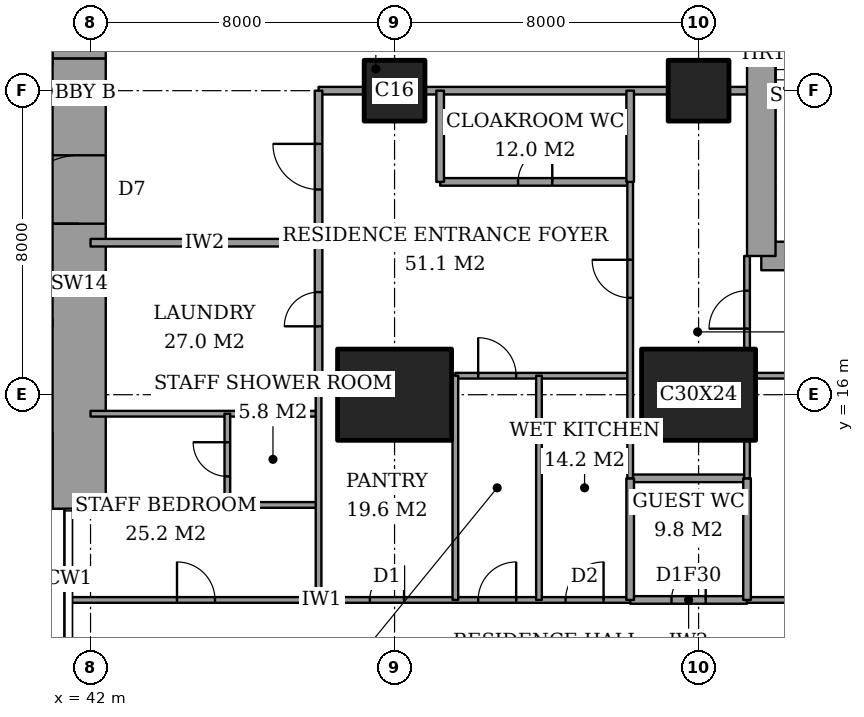
"""IFC4 building model, lengths in metres.
Left out: names, types, materials, properties, quantities, classifications, styles, units other than length and angle.
Written with IfcOpenShell. Run it as: python <this file> out.ifc"""

import sys

from ifc_helpers import new_model, si_unit, direction, frame, frame_2d, origin, origin_2d, place, context, subcontext, project, spatial, rectangle, extrude, element, fill, save


model = new_model("IFC4")
c1 = context("Model", 3, precision=1e-05, world=origin(), true_north=direction((0.0, 1.0)))
c2 = subcontext(c1, "Body", "Model", "MODEL_VIEW")
j1 = project(units=[si_unit("LENGTHUNIT", "METRE"), si_unit("PLANEANGLEUNIT", "RADIAN")], contexts=[c1])
p1 = place(None, origin())
s1 = spatial("IfcSite", under=j1, at=p1, CompositionType="ELEMENT")
p2 = place(p1, origin())
s2 = spatial("IfcBuilding", under=s1, at=p2, CompositionType="ELEMENT")
p3 = place(p2, frame((0.0, 0.0, 266.4)))
s3 = spatial("IfcBuildingStorey", under=s2, at=p3, CompositionType="ELEMENT", Elevation=266.4)
p4 = place(p3, frame((50.0, 16.0, 0.0), z_axis=(0.0, 0.0, 1.0), x_axis=(1.0, 0.0, 0.0)))
e1 = element("IfcColumn", 1, at=p4, inside=s3, PredefinedType="COLUMN", context=c2, shape_type="SweptSolid", body=[
    extrude(rectangle(XDim=3.0, YDim=2.4, at=origin_2d()), origin(), (0.0, 0.0, 1.0), 3.6),
])
p5 = place(p3, frame((50.0, 24.0, 0.0), z_axis=(0.0, 0.0, 1.0), x_axis=(1.0, 0.0, 0.0)))
e2 = element("IfcColumn", 2, at=p5, inside=s3, PredefinedType="COLUMN", context=c2, shape_type="SweptSolid", body=[
    extrude(rectangle(XDim=1.6, YDim=1.6, at=origin_2d()), origin(), (0.0, 0.0, 1.0), 3.6),
])
p6 = place(p3, frame((58.0, 16.0, 0.0), z_axis=(0.0, 0.0, 1.0), x_axis=(1.0, 0.0, 0.0)))
e3 = element("IfcColumn", 3, at=p6, inside=s3, PredefinedType="COLUMN", context=c2, shape_type="SweptSolid", body=[
    extrude(rectangle(XDim=3.0, YDim=2.4, at=origin_2d()), origin(), (0.0, 0.0, 1.0), 3.6),
])
p7 = place(p3, frame((58.0, 24.0, 0.0), z_axis=(0.0, 0.0, 1.0), x_axis=(1.0, 0.0, 0.0)))
e4 = element("IfcColumn", 4, at=p7, inside=s3, PredefinedType="COLUMN", context=c2, shape_type="SweptSolid", body=[
    extrude(rectangle(XDim=1.6, YDim=1.6, at=origin_2d()), origin(), (0.0, 0.0, 1.0), 3.6),
])
p8 = place(p3, frame((41.7, 13.0, 0.0), z_axis=(0.0, 0.0, 1.0), x_axis=(0.0, 1.0, 0.0)))
e5 = element("IfcWall", 5, at=p8, inside=s3, PredefinedType="SHEAR", context=c2, shape_type="SweptSolid", body=[
    extrude(rectangle(XDim=11.85, YDim=1.4, at=frame_2d((5.925, 0.0))), origin(), (0.0, 0.0, 1.0), 3.6),
])
p9 = place(p8, frame((7.5, 0.0, 0.0)))
e6 = element("IfcOpeningElement", 6, at=p9, cuts=e5, PredefinedType="OPENING", context=c2, shape_type="SweptSolid", body=[
    extrude(rectangle(XDim=1.8, YDim=2.4, at=frame_2d((0.9, 1.2))), frame((0.0, 0.71, 0.0), z_axis=(0.0, -1.0, 0.0), x_axis=(1.0, 0.0, 0.0)), (0.0, 0.0, 1.0), 1.42),
])
p10 = place(p3, frame((41.7, 24.85, 0.0), z_axis=(0.0, 0.0, 1.0), x_axis=(0.0, 1.0, 0.0)))
e7 = element("IfcWall", 7, at=p10, inside=s3, PredefinedType="SHEAR", context=c2, shape_type="SweptSolid", body=[
    extrude(rectangle(XDim=10.15, YDim=1.4, at=frame_2d((5.075, 0.0))), origin(), (0.0, 0.0, 1.0), 3.6),
])
p11 = place(p3, frame((59.65, 19.65, 0.0), z_axis=(0.0, 0.0, 1.0), x_axis=(1.0, 0.0, 0.0)))
e8 = element("IfcWall", 8, at=p11, inside=s3, PredefinedType="SHEAR", context=c2, shape_type="SweptSolid", body=[
    extrude(rectangle(XDim=4.45, YDim=0.75, at=frame_2d((2.225, 0.0))), origin(), (0.0, 0.0, 1.0), 3.6),
])
p12 = place(p3, frame((59.65, 28.35, 0.0), z_axis=(0.0, 0.0, 1.0), x_axis=(0.0, -1.0, 0.0)))
e9 = element("IfcWall", 9, at=p12, inside=s3, PredefinedType="SHEAR", context=c2, shape_type="SweptSolid", body=[
    extrude(rectangle(XDim=8.7, YDim=0.75, at=frame_2d((4.35, 0.0))), origin(), (0.0, 0.0, 1.0), 3.6),
])
p13 = place(p12, frame((0.975, 0.0, 0.0)))
e10 = element("IfcOpeningElement", 10, at=p13, cuts=e9, PredefinedType="OPENING", context=c2, shape_type="SweptSolid", body=[
    extrude(rectangle(XDim=1.0, YDim=2.1, at=frame_2d((0.5, 1.05))), frame((0.0, 0.385, 0.0), z_axis=(0.0, -1.0, 0.0), x_axis=(1.0, 0.0, 0.0)), (0.0, 0.0, 1.0), 0.77),
])
p14 = place(p3, frame((56.2, 10.6, 0.0), z_axis=(0.0, 0.0, 1.0), x_axis=(1.0, 0.0, 0.0)))
e11 = element("IfcWall", 11, at=p14, inside=s3, PredefinedType="PARTITIONING", context=c2, shape_type="SweptSolid", body=[
    extrude(rectangle(XDim=3.075, YDim=0.2, at=frame_2d((1.538, 0.0))), origin(), (0.0, 0.0, 1.0), 3.35),
])
p15 = place(p14, frame((1.087, 0.0, 0.0)))
e12 = element("IfcOpeningElement", 12, at=p15, cuts=e11, PredefinedType="OPENING", context=c2, shape_type="SweptSolid", body=[
    extrude(rectangle(XDim=0.9, YDim=2.1, at=frame_2d((0.45, 1.05))), frame((0.0, 0.11, 0.0), z_axis=(0.0, -1.0, 0.0), x_axis=(1.0, 0.0, 0.0)), (0.0, 0.0, 1.0), 0.22),
])
p16 = place(p3, frame((41.439, 10.6, 0.0), z_axis=(0.0, 0.0, 1.0), x_axis=(1.0, 0.0, 0.0)))
e13 = element("IfcWall", 13, at=p16, inside=s3, PredefinedType="PARTITIONING", context=c2, shape_type="SweptSolid", body=[
    extrude(rectangle(XDim=14.761, YDim=0.15, at=frame_2d((7.38, 0.0))), origin(), (0.0, 0.0, 1.0), 3.35),
])
p17 = place(p16, frame((10.761, 0.0, 0.0)))
e14 = element("IfcOpeningElement", 14, at=p17, cuts=e13, PredefinedType="OPENING", context=c2, shape_type="SweptSolid", body=[
    extrude(rectangle(XDim=1.0, YDim=2.1, at=frame_2d((0.5, 1.05))), frame((0.0, 0.085, 0.0), z_axis=(0.0, -1.0, 0.0), x_axis=(1.0, 0.0, 0.0)), (0.0, 0.0, 1.0), 0.17),
])
p18 = place(p16, frame((13.061, 0.0, 0.0)))
e15 = element("IfcOpeningElement", 15, at=p18, cuts=e13, PredefinedType="OPENING", context=c2, shape_type="SweptSolid", body=[
    extrude(rectangle(XDim=1.0, YDim=2.1, at=frame_2d((0.5, 1.05))), frame((0.0, 0.085, 0.0), z_axis=(0.0, -1.0, 0.0), x_axis=(1.0, 0.0, 0.0)), (0.0, 0.0, 1.0), 0.17),
])
p19 = place(p16, frame((7.911, 0.0, 0.0)))
e16 = element("IfcOpeningElement", 16, at=p19, cuts=e13, PredefinedType="OPENING", context=c2, shape_type="SweptSolid", body=[
    extrude(rectangle(XDim=0.9, YDim=2.1, at=frame_2d((0.45, 1.05))), frame((0.0, 0.085, 0.0), z_axis=(0.0, -1.0, 0.0), x_axis=(1.0, 0.0, 0.0)), (0.0, 0.0, 1.0), 0.17),
])
p20 = place(p16, frame((2.836, 0.0, 0.0)))
e17 = element("IfcOpeningElement", 17, at=p20, cuts=e13, PredefinedType="OPENING", context=c2, shape_type="SweptSolid", body=[
    extrude(rectangle(XDim=1.0, YDim=2.1, at=frame_2d((0.5, 1.05))), frame((0.0, 0.085, 0.0), z_axis=(0.0, -1.0, 0.0), x_axis=(1.0, 0.0, 0.0)), (0.0, 0.0, 1.0), 0.17),
])
p21 = place(p3, frame((59.275, 10.6, 0.0), z_axis=(0.0, 0.0, 1.0), x_axis=(1.0, 0.0, 0.0)))
e18 = element("IfcWall", 18, at=p21, inside=s3, PredefinedType="PARTITIONING", context=c2, shape_type="SweptSolid", body=[
    extrude(rectangle(XDim=7.175, YDim=0.15, at=frame_2d((3.587, 0.0))), origin(), (0.0, 0.0, 1.0), 3.35),
])
p22 = place(p21, frame((3.087, 0.0, 0.0)))
e19 = element("IfcOpeningElement", 19, at=p22, cuts=e18, PredefinedType="OPENING", context=c2, shape_type="SweptSolid", body=[
    extrude(rectangle(XDim=1.0, YDim=2.1, at=frame_2d((0.5, 1.05))), frame((0.0, 0.085, 0.0), z_axis=(0.0, -1.0, 0.0), x_axis=(1.0, 0.0, 0.0)), (0.0, 0.0, 1.0), 0.17),
])
p23 = place(p3, frame((45.6, 13.1, 0.0), z_axis=(0.0, 0.0, 1.0), x_axis=(1.0, 0.0, 0.0)))
e20 = element("IfcWall", 20, at=p23, inside=s3, PredefinedType="PARTITIONING", context=c2, shape_type="SweptSolid", body=[
    extrude(rectangle(XDim=2.4, YDim=0.15, at=frame_2d((1.2, 0.0))), origin(), (0.0, 0.0, 1.0), 3.35),
])
p24 = place(p3, frame((56.2, 13.8, 0.0), z_axis=(0.0, 0.0, 1.0), x_axis=(1.0, 0.0, 0.0)))
e21 = element("IfcWall", 21, at=p24, inside=s3, PredefinedType="PARTITIONING", context=c2, shape_type="SweptSolid", body=[
    extrude(rectangle(XDim=3.075, YDim=0.2, at=frame_2d((1.538, 0.0))), origin(), (0.0, 0.0, 1.0), 3.35),
])
p25 = place(p3, frame((42.0, 15.5, 0.0), z_axis=(0.0, 0.0, 1.0), x_axis=(1.0, 0.0, 0.0)))
e22 = element("IfcWall", 22, at=p25, inside=s3, PredefinedType="PARTITIONING", context=c2, shape_type="SweptSolid", body=[
    extrude(rectangle(XDim=6.0, YDim=0.15, at=frame_2d((3.0, 0.0))), origin(), (0.0, 0.0, 1.0), 3.35),
])
p26 = place(p3, frame((48.0, 16.05, 0.0), z_axis=(0.0, 0.0, 1.0), x_axis=(1.0, 0.0, 0.0)))
e23 = element("IfcWall", 23, at=p26, inside=s3, PredefinedType="PARTITIONING", context=c2, shape_type="SweptSolid", body=[
    extrude(rectangle(XDim=0.5, YDim=0.15, at=frame_2d((0.25, 0.0))), origin(), (0.0, 0.0, 1.0), 2.634),
])
p27 = place(p3, frame((51.6, 16.5, 0.0), z_axis=(0.0, 0.0, 1.0), x_axis=(1.0, 0.0, 0.0)))
e24 = element("IfcWall", 24, at=p27, inside=s3, PredefinedType="PARTITIONING", context=c2, shape_type="SweptSolid", body=[
    extrude(rectangle(XDim=4.6, YDim=0.15, at=frame_2d((2.3, 0.0))), origin(), (0.0, 0.0, 1.0), 3.35),
])
p28 = place(p27, frame((0.6, 0.0, 0.0)))
e25 = element("IfcOpeningElement", 25, at=p28, cuts=e24, PredefinedType="OPENING", context=c2, shape_type="SweptSolid", body=[
    extrude(rectangle(XDim=1.0, YDim=2.1, at=frame_2d((0.5, 1.05))), frame((0.0, 0.085, 0.0), z_axis=(0.0, -1.0, 0.0), x_axis=(1.0, 0.0, 0.0)), (0.0, 0.0, 1.0), 0.17),
])
p29 = place(p3, frame((59.5, 16.5, 0.0), z_axis=(0.0, 0.0, 1.0), x_axis=(1.0, 0.0, 0.0)))
e26 = element("IfcWall", 26, at=p29, inside=s3, PredefinedType="PARTITIONING", context=c2, shape_type="SweptSolid", body=[
    extrude(rectangle(XDim=5.35, YDim=0.15, at=frame_2d((2.675, 0.0))), origin(), (0.0, 0.0, 1.0), 3.35),
])
p30 = place(p3, frame((42.0, 20.0, 0.0), z_axis=(0.0, 0.0, 1.0), x_axis=(1.0, 0.0, 0.0)))
e27 = element("IfcWall", 27, at=p30, inside=s3, PredefinedType="PARTITIONING", context=c2, shape_type="SweptSolid", body=[
    extrude(rectangle(XDim=6.0, YDim=0.2, at=frame_2d((3.0, 0.0))), origin(), (0.0, 0.0, 1.0), 3.35),
])
p31 = place(p3, frame((51.2, 21.6, 0.0), z_axis=(0.0, 0.0, 1.0), x_axis=(1.0, 0.0, 0.0)))
e28 = element("IfcWall", 28, at=p31, inside=s3, PredefinedType="PARTITIONING", context=c2, shape_type="SweptSolid", body=[
    extrude(rectangle(XDim=5.0, YDim=0.2, at=frame_2d((2.5, 0.0))), origin(), (0.0, 0.0, 1.0), 3.35),
])
p32 = place(p31, frame((2.05, 0.0, 0.0)))
e29 = element("IfcOpeningElement", 29, at=p32, cuts=e28, PredefinedType="OPENING", context=c2, shape_type="SweptSolid", body=[
    extrude(rectangle(XDim=0.9, YDim=2.1, at=frame_2d((0.45, 1.05))), frame((0.0, 0.11, 0.0), z_axis=(0.0, -1.0, 0.0), x_axis=(1.0, 0.0, 0.0)), (0.0, 0.0, 1.0), 0.22),
])
p33 = place(p3, frame((48.0, 24.0, 0.0), z_axis=(0.0, 0.0, 1.0), x_axis=(1.0, 0.0, 0.0)))
e30 = element("IfcWall", 30, at=p33, inside=s3, PredefinedType="PARTITIONING", context=c2, shape_type="SweptSolid", body=[
    extrude(rectangle(XDim=1.2, YDim=0.2, at=frame_2d((0.6, 0.0))), origin(), (0.0, 0.0, 1.0), 3.35),
])
p34 = place(p3, frame((50.8, 24.0, 0.0), z_axis=(0.0, 0.0, 1.0), x_axis=(1.0, 0.0, 0.0)))
e31 = element("IfcWall", 31, at=p34, inside=s3, PredefinedType="PARTITIONING", context=c2, shape_type="SweptSolid", body=[
    extrude(rectangle(XDim=6.4, YDim=0.2, at=frame_2d((3.2, 0.0))), origin(), (0.0, 0.0, 1.0), 3.35),
])
p35 = place(p3, frame((58.8, 24.0, 0.0), z_axis=(0.0, 0.0, 1.0), x_axis=(1.0, 0.0, 0.0)))
e32 = element("IfcWall", 32, at=p35, inside=s3, PredefinedType="PARTITIONING", context=c2, shape_type="SweptSolid", body=[
    extrude(rectangle(XDim=0.475, YDim=0.2, at=frame_2d((0.237, 0.0))), origin(), (0.0, 0.0, 1.0), 3.35),
])
p36 = place(p3, frame((45.6, 13.1, 0.0), z_axis=(0.0, 0.0, 1.0), x_axis=(0.0, 1.0, 0.0)))
e33 = element("IfcWall", 33, at=p36, inside=s3, PredefinedType="PARTITIONING", context=c2, shape_type="SweptSolid", body=[
    extrude(rectangle(XDim=2.4, YDim=0.15, at=frame_2d((1.2, 0.0))), origin(), (0.0, 0.0, 1.0), 3.35),
])
p37 = place(p36, frame((0.75, 0.0, 0.0)))
e34 = element("IfcOpeningElement", 34, at=p37, cuts=e33, PredefinedType="OPENING", context=c2, shape_type="SweptSolid", body=[
    extrude(rectangle(XDim=0.9, YDim=2.1, at=frame_2d((0.45, 1.05))), frame((0.0, 0.085, 0.0), z_axis=(0.0, -1.0, 0.0), x_axis=(1.0, 0.0, 0.0)), (0.0, 0.0, 1.0), 0.17),
])
p38 = place(p3, frame((48.0, 16.5, 0.0), z_axis=(0.0, 0.0, 1.0), x_axis=(0.0, 1.0, 0.0)))
e35 = element("IfcWall", 35, at=p38, inside=s3, PredefinedType="PARTITIONING", context=c2, shape_type="SweptSolid", body=[
    extrude(rectangle(XDim=7.5, YDim=0.2, at=frame_2d((3.75, 0.0))), origin(), (0.0, 0.0, 1.0), 3.35),
])
p39 = place(p38, frame((4.9, 0.0, 0.0)))
e36 = element("IfcOpeningElement", 36, at=p39, cuts=e35, PredefinedType="OPENING", context=c2, shape_type="SweptSolid", body=[
    extrude(rectangle(XDim=1.2, YDim=2.4, at=frame_2d((0.6, 1.2))), frame((0.0, 0.11, 0.0), z_axis=(0.0, -1.0, 0.0), x_axis=(1.0, 0.0, 0.0)), (0.0, 0.0, 1.0), 0.22),
])
p40 = place(p38, frame((1.3, 0.0, 0.0)))
e37 = element("IfcOpeningElement", 37, at=p40, cuts=e35, PredefinedType="OPENING", context=c2, shape_type="SweptSolid", body=[
    extrude(rectangle(XDim=0.9, YDim=2.1, at=frame_2d((0.45, 1.05))), frame((0.0, 0.11, 0.0), z_axis=(0.0, -1.0, 0.0), x_axis=(1.0, 0.0, 0.0)), (0.0, 0.0, 1.0), 0.22),
])
p41 = place(p3, frame((48.0, 10.6, 0.0), z_axis=(0.0, 0.0, 1.0), x_axis=(0.0, 1.0, 0.0)))
e38 = element("IfcWall", 38, at=p41, inside=s3, PredefinedType="PARTITIONING", context=c2, shape_type="SweptSolid", body=[
    extrude(rectangle(XDim=5.9, YDim=0.15, at=frame_2d((2.95, 0.0))), origin(), (0.0, 0.0, 1.0), 3.35),
])
p42 = place(p3, frame((51.2, 21.6, 0.0), z_axis=(0.0, 0.0, 1.0), x_axis=(0.0, 1.0, 0.0)))
e39 = element("IfcWall", 39, at=p42, inside=s3, PredefinedType="PARTITIONING", context=c2, shape_type="SweptSolid", body=[
    extrude(rectangle(XDim=2.4, YDim=0.2, at=frame_2d((1.2, 0.0))), origin(), (0.0, 0.0, 1.0), 3.35),
])
for number, where, z_axis, x_axis in (
    (40, (51.6, 10.6, 0.0), (0.0, 0.0, 1.0), (0.0, 1.0, 0.0)),
    (41, (53.8, 10.6, 0.0), (0.0, 0.0, 1.0), (0.0, 1.0, 0.0)),
):
    element("IfcWall", number, at=place(p3, frame(where, z_axis=z_axis, x_axis=x_axis)), inside=s3, PredefinedType="PARTITIONING", context=c2, shape_type="SweptSolid", body=[
        extrude(rectangle(XDim=5.9, YDim=0.15, at=frame_2d((2.95, 0.0))), origin(), (0.0, 0.0, 1.0), 3.35),
    ])
p43 = place(p3, frame((56.2, 10.6, 0.0), z_axis=(0.0, 0.0, 1.0), x_axis=(0.0, 1.0, 0.0)))
e42 = element("IfcWall", 42, at=p43, inside=s3, PredefinedType="PARTITIONING", context=c2, shape_type="SweptSolid", body=[
    extrude(rectangle(XDim=3.2, YDim=0.2, at=frame_2d((1.6, 0.0))), origin(), (0.0, 0.0, 1.0), 3.35),
])
p44 = place(p3, frame((56.2, 21.6, 0.0), z_axis=(0.0, 0.0, 1.0), x_axis=(0.0, 1.0, 0.0)))
e43 = element("IfcWall", 43, at=p44, inside=s3, PredefinedType="PARTITIONING", context=c2, shape_type="SweptSolid", body=[
    extrude(rectangle(XDim=2.4, YDim=0.2, at=frame_2d((1.2, 0.0))), origin(), (0.0, 0.0, 1.0), 3.35),
])
p45 = place(p3, frame((56.2, 13.8, 0.0), z_axis=(0.0, 0.0, 1.0), x_axis=(0.0, 1.0, 0.0)))
e44 = element("IfcWall", 44, at=p45, inside=s3, PredefinedType="PARTITIONING", context=c2, shape_type="SweptSolid", body=[
    extrude(rectangle(XDim=7.8, YDim=0.15, at=frame_2d((3.9, 0.0))), origin(), (0.0, 0.0, 1.0), 3.35),
])
p46 = place(p45, frame((4.75, 0.0, 0.0)))
e45 = element("IfcOpeningElement", 45, at=p46, cuts=e44, PredefinedType="OPENING", context=c2, shape_type="SweptSolid", body=[
    extrude(rectangle(XDim=1.0, YDim=2.1, at=frame_2d((0.5, 1.05))), frame((0.0, 0.085, 0.0), z_axis=(0.0, -1.0, 0.0), x_axis=(1.0, 0.0, 0.0)), (0.0, 0.0, 1.0), 0.17),
])
p47 = place(p3, frame((59.275, 10.6, 0.0), z_axis=(0.0, 0.0, 1.0), x_axis=(0.0, 1.0, 0.0)))
e46 = element("IfcWall", 46, at=p47, inside=s3, PredefinedType="PARTITIONING", context=c2, shape_type="SweptSolid", body=[
    extrude(rectangle(XDim=3.2, YDim=0.2, at=frame_2d((1.6, 0.0))), origin(), (0.0, 0.0, 1.0), 3.35),
])
p48 = place(p3, frame((59.275, 13.8, 0.0), z_axis=(0.0, 0.0, 1.0), x_axis=(0.0, 1.0, 0.0)))
e47 = element("IfcWall", 47, at=p48, inside=s3, PredefinedType="PARTITIONING", context=c2, shape_type="SweptSolid", body=[
    extrude(rectangle(XDim=1.0, YDim=0.15, at=frame_2d((0.5, 0.0))), origin(), (0.0, 0.0, 1.0), 3.35),
])
p49 = place(p3, frame((59.275, 17.2, 0.0), z_axis=(0.0, 0.0, 1.0), x_axis=(0.0, 1.0, 0.0)))
e48 = element("IfcWall", 48, at=p49, inside=s3, PredefinedType="PARTITIONING", context=c2, shape_type="SweptSolid", body=[
    extrude(rectangle(XDim=2.45, YDim=0.15, at=frame_2d((1.225, 0.0))), origin(), (0.0, 0.0, 1.0), 3.35),
])
p50 = place(p49, frame((0.538, 0.0, 0.0)))
e49 = element("IfcOpeningElement", 49, at=p50, cuts=e48, PredefinedType="OPENING", context=c2, shape_type="SweptSolid", body=[
    extrude(rectangle(XDim=1.0, YDim=2.1, at=frame_2d((0.5, 1.05))), frame((0.0, 0.085, 0.0), z_axis=(0.0, -1.0, 0.0), x_axis=(1.0, 0.0, 0.0)), (0.0, 0.0, 1.0), 0.17),
])
p51 = place(p3, frame((28.3, 17.9, 0.0), z_axis=(0.0, 0.0, 1.0), x_axis=(1.0, 0.0, 0.0)))
e50 = element("IfcWall", 50, at=p51, inside=s3, PredefinedType="PARTITIONING", context=c2, shape_type="SweptSolid", body=[
    extrude(rectangle(XDim=12.7, YDim=0.2, at=frame_2d((6.35, 0.0))), origin(), (0.0, 0.0, 1.0), 3.6),
])
p52 = place(p51, frame((1.05, 0.0, 0.0)))
e51 = element("IfcOpeningElement", 51, at=p52, cuts=e50, PredefinedType="OPENING", context=c2, shape_type="SweptSolid", body=[
    extrude(rectangle(XDim=0.9, YDim=2.1, at=frame_2d((0.45, 1.05))), frame((0.0, 0.11, 0.0), z_axis=(0.0, -1.0, 0.0), x_axis=(1.0, 0.0, 0.0)), (0.0, 0.0, 1.0), 0.22),
])
p53 = place(p51, frame((10.6, 0.0, 0.0)))
e52 = element("IfcOpeningElement", 52, at=p53, cuts=e50, PredefinedType="OPENING", context=c2, shape_type="SweptSolid", body=[
    extrude(rectangle(XDim=1.2, YDim=2.1, at=frame_2d((0.6, 1.05))), frame((0.0, 0.11, 0.0), z_axis=(0.0, -1.0, 0.0), x_axis=(1.0, 0.0, 0.0)), (0.0, 0.0, 1.0), 0.22),
])
p54 = place(p17, origin())
e53 = element("IfcDoor", 53, at=p54, inside=s3, OperationType="SINGLE_SWING_LEFT", PredefinedType="DOOR", context=c2, shape_type="SweptSolid", body=[
    extrude(rectangle(XDim=1.0, YDim=2.1, at=frame_2d((0.5, 1.05))), frame((0.0, 0.025, 0.0), z_axis=(0.0, -1.0, 0.0), x_axis=(1.0, 0.0, 0.0)), (0.0, 0.0, 1.0), 0.05),
])
fill(e14, e53)
p55 = place(p50, origin())
e54 = element("IfcDoor", 54, at=p55, inside=s3, OperationType="SINGLE_SWING_RIGHT", PredefinedType="DOOR", context=c2, shape_type="SweptSolid", body=[
    extrude(rectangle(XDim=1.0, YDim=2.1, at=frame_2d((0.5, 1.05))), frame((0.0, 0.025, 0.0), z_axis=(0.0, -1.0, 0.0), x_axis=(1.0, 0.0, 0.0)), (0.0, 0.0, 1.0), 0.05),
])
fill(e49, e54)
p56 = place(p15, origin())
e55 = element("IfcDoor", 55, at=p56, inside=s3, OperationType="SINGLE_SWING_LEFT", PredefinedType="DOOR", context=c2, shape_type="SweptSolid", body=[
    extrude(rectangle(XDim=0.9, YDim=2.1, at=frame_2d((0.45, 1.05))), frame((0.0, 0.025, 0.0), z_axis=(0.0, -1.0, 0.0), x_axis=(1.0, 0.0, 0.0)), (0.0, 0.0, 1.0), 0.05),
])
fill(e12, e55)
p57 = place(p46, origin())
e56 = element("IfcDoor", 56, at=p57, inside=s3, OperationType="SINGLE_SWING_LEFT", PredefinedType="DOOR", context=c2, shape_type="SweptSolid", body=[
    extrude(rectangle(XDim=1.0, YDim=2.1, at=frame_2d((0.5, 1.05))), frame((0.0, 0.025, 0.0), z_axis=(0.0, -1.0, 0.0), x_axis=(1.0, 0.0, 0.0)), (0.0, 0.0, 1.0), 0.05),
])
fill(e45, e56)
p58 = place(p32, origin())
e57 = element("IfcDoor", 57, at=p58, inside=s3, OperationType="SINGLE_SWING_LEFT", PredefinedType="DOOR", context=c2, shape_type="SweptSolid", body=[
    extrude(rectangle(XDim=0.9, YDim=2.1, at=frame_2d((0.45, 1.05))), frame((0.0, 0.025, 0.0), z_axis=(0.0, -1.0, 0.0), x_axis=(1.0, 0.0, 0.0)), (0.0, 0.0, 1.0), 0.05),
])
fill(e29, e57)
p59 = place(p39, origin())
e58 = element("IfcDoor", 58, at=p59, inside=s3, OperationType="SINGLE_SWING_LEFT", PredefinedType="DOOR", context=c2, shape_type="SweptSolid", body=[
    extrude(rectangle(XDim=1.2, YDim=2.4, at=frame_2d((0.6, 1.2))), frame((0.0, 0.025, 0.0), z_axis=(0.0, -1.0, 0.0), x_axis=(1.0, 0.0, 0.0)), (0.0, 0.0, 1.0), 0.05),
])
fill(e36, e58)
p60 = place(p18, origin())
e59 = element("IfcDoor", 59, at=p60, inside=s3, OperationType="SINGLE_SWING_LEFT", PredefinedType="DOOR", context=c2, shape_type="SweptSolid", body=[
    extrude(rectangle(XDim=1.0, YDim=2.1, at=frame_2d((0.5, 1.05))), frame((0.0, 0.025, 0.0), z_axis=(0.0, -1.0, 0.0), x_axis=(1.0, 0.0, 0.0)), (0.0, 0.0, 1.0), 0.05),
])
fill(e15, e59)
p61 = place(p28, origin())
e60 = element("IfcDoor", 60, at=p61, inside=s3, OperationType="SINGLE_SWING_RIGHT", PredefinedType="DOOR", context=c2, shape_type="SweptSolid", body=[
    extrude(rectangle(XDim=1.0, YDim=2.1, at=frame_2d((0.5, 1.05))), frame((0.0, 0.025, 0.0), z_axis=(0.0, -1.0, 0.0), x_axis=(1.0, 0.0, 0.0)), (0.0, 0.0, 1.0), 0.05),
])
fill(e25, e60)
p62 = place(p19, origin())
e61 = element("IfcDoor", 61, at=p62, inside=s3, OperationType="SINGLE_SWING_LEFT", PredefinedType="DOOR", context=c2, shape_type="SweptSolid", body=[
    extrude(rectangle(XDim=0.9, YDim=2.1, at=frame_2d((0.45, 1.05))), frame((0.0, 0.025, 0.0), z_axis=(0.0, -1.0, 0.0), x_axis=(1.0, 0.0, 0.0)), (0.0, 0.0, 1.0), 0.05),
])
fill(e16, e61)
p63 = place(p37, origin())
e62 = element("IfcDoor", 62, at=p63, inside=s3, OperationType="SINGLE_SWING_LEFT", PredefinedType="DOOR", context=c2, shape_type="SweptSolid", body=[
    extrude(rectangle(XDim=0.9, YDim=2.1, at=frame_2d((0.45, 1.05))), frame((0.0, 0.025, 0.0), z_axis=(0.0, -1.0, 0.0), x_axis=(1.0, 0.0, 0.0)), (0.0, 0.0, 1.0), 0.05),
])
fill(e34, e62)
p64 = place(p20, origin())
e63 = element("IfcDoor", 63, at=p64, inside=s3, OperationType="SINGLE_SWING_RIGHT", PredefinedType="DOOR", context=c2, shape_type="SweptSolid", body=[
    extrude(rectangle(XDim=1.0, YDim=2.1, at=frame_2d((0.5, 1.05))), frame((0.0, 0.025, 0.0), z_axis=(0.0, -1.0, 0.0), x_axis=(1.0, 0.0, 0.0)), (0.0, 0.0, 1.0), 0.05),
])
fill(e17, e63)
p65 = place(p40, origin())
e64 = element("IfcDoor", 64, at=p65, inside=s3, OperationType="SINGLE_SWING_RIGHT", PredefinedType="DOOR", context=c2, shape_type="SweptSolid", body=[
    extrude(rectangle(XDim=0.9, YDim=2.1, at=frame_2d((0.45, 1.05))), frame((0.0, 0.025, 0.0), z_axis=(0.0, -1.0, 0.0), x_axis=(1.0, 0.0, 0.0)), (0.0, 0.0, 1.0), 0.05),
])
fill(e37, e64)
p66 = place(p9, origin())
e65 = element("IfcDoor", 65, at=p66, inside=s3, OperationType="DOUBLE_DOOR_DOUBLE_SWING", PredefinedType="DOOR", context=c2, shape_type="SweptSolid", body=[
    extrude(rectangle(XDim=1.8, YDim=2.4, at=frame_2d((0.9, 1.2))), frame((0.0, 0.025, 0.0), z_axis=(0.0, -1.0, 0.0), x_axis=(1.0, 0.0, 0.0)), (0.0, 0.0, 1.0), 0.05),
])
fill(e6, e65)
save(model, sys.argv[1])
